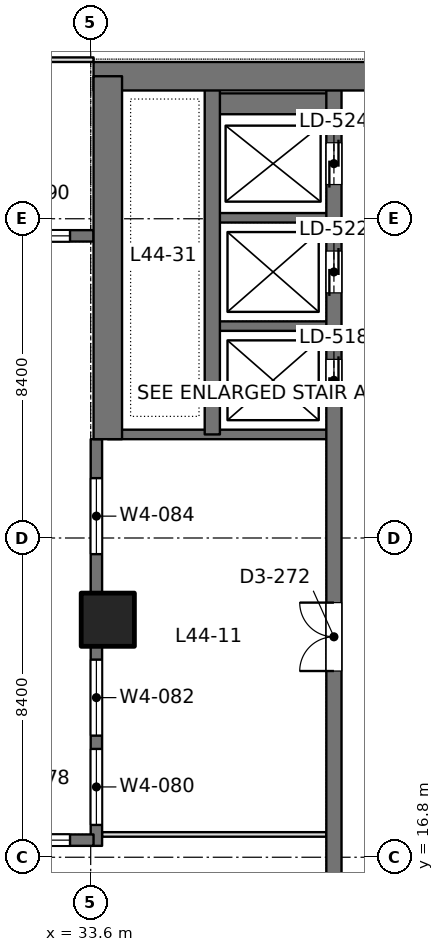
"""IFC4 building model, lengths in metres.
Left out: names, types, materials, properties, quantities, classifications, styles, units other than length and angle.
Written with IfcOpenShell. Run it as: python <this file> out.ifc"""

import sys

from ifc_helpers import new_model, si_unit, direction, frame, frame_2d, origin, origin_2d, place, context, subcontext, project, spatial, rectangle, extrude, element, fill, save


model = new_model("IFC4")
c1 = context("Model", 3, precision=1e-05, world=origin(), true_north=direction((0.0, 1.0)))
c2 = subcontext(c1, "Body", "Model", "MODEL_VIEW")
j1 = project(units=[si_unit("LENGTHUNIT", "METRE"), si_unit("PLANEANGLEUNIT", "RADIAN")], contexts=[c1])
p1 = place(None, origin())
s1 = spatial("IfcSite", under=j1, at=p1, CompositionType="ELEMENT")
p2 = place(p1, origin())
s2 = spatial("IfcBuilding", under=s1, at=p2, CompositionType="ELEMENT")
p3 = place(p2, frame((0.0, 0.0, 194.4)))
s3 = spatial("IfcBuildingStorey", under=s2, at=p3, CompositionType="ELEMENT", Elevation=194.4)
p4 = place(p3, frame((34.05, 23.05, 0.0), z_axis=(0.0, 0.0, 1.0), x_axis=(1.0, 0.0, 0.0)))
e1 = element("IfcColumn", 1, at=p4, inside=s3, PredefinedType="COLUMN", context=c2, shape_type="SweptSolid", body=[
    extrude(rectangle(XDim=1.4, YDim=1.4, at=origin_2d()), origin(), (0.0, 0.0, 1.0), 4.2),
])
p5 = place(p3, frame((33.675, 37.35, 0.0), z_axis=(0.0, 0.0, 1.0), x_axis=(1.0, 0.0, 0.0)))
e2 = element("IfcWall", 2, at=p5, inside=s3, PredefinedType="SHEAR", context=c2, shape_type="SweptSolid", body=[
    extrude(rectangle(XDim=17.85, YDim=0.75, at=frame_2d((8.925, 0.0))), origin(), (0.0, 0.0, 1.0), 4.2),
])
p6 = place(p5, frame((7.175, 0.0, 0.0)))
e3 = element("IfcOpeningElement", 3, at=p6, cuts=e2, PredefinedType="OPENING", context=c2, shape_type="SweptSolid", body=[
    extrude(rectangle(XDim=1.8, YDim=2.4, at=frame_2d((0.9, 1.2))), frame((0.0, 0.385, 0.0), z_axis=(0.0, -1.0, 0.0), x_axis=(1.0, 0.0, 0.0)), (0.0, 0.0, 1.0), 0.77),
])
p7 = place(p3, frame((34.05, 27.8, 0.0), z_axis=(0.0, 0.0, 1.0), x_axis=(0.0, 1.0, 0.0)))
e4 = element("IfcWall", 4, at=p7, inside=s3, PredefinedType="SHEAR", context=c2, shape_type="SweptSolid", body=[
    extrude(rectangle(XDim=9.55, YDim=0.75, at=frame_2d((4.775, 0.0))), origin(), (0.0, 0.0, 1.0), 4.2),
])
p8 = place(p3, frame((40.0, 13.05, 0.0), z_axis=(0.0, 0.0, 1.0), x_axis=(0.0, 1.0, 0.0)))
e5 = element("IfcWall", 5, at=p8, inside=s3, PredefinedType="SHEAR", context=c2, shape_type="SweptSolid", body=[
    extrude(rectangle(XDim=24.3, YDim=0.4, at=frame_2d((12.15, 0.0))), origin(), (0.0, 0.0, 1.0), 4.2),
])
p9 = place(p8, frame((15.75, 0.0, 0.0)))
e6 = element("IfcOpeningElement", 6, at=p9, cuts=e5, PredefinedType="OPENING", context=c2, shape_type="SweptSolid", body=[
    extrude(rectangle(XDim=1.1, YDim=2.2, at=frame_2d((0.55, 1.1))), frame((0.0, 0.21, 0.0), z_axis=(0.0, -1.0, 0.0), x_axis=(1.0, 0.0, 0.0)), (0.0, 0.0, 1.0), 0.42),
])
p10 = place(p8, frame((18.6, 0.0, 0.0)))
e7 = element("IfcOpeningElement", 7, at=p10, cuts=e5, PredefinedType="OPENING", context=c2, shape_type="SweptSolid", body=[
    extrude(rectangle(XDim=1.1, YDim=2.2, at=frame_2d((0.55, 1.1))), frame((0.0, 0.21, 0.0), z_axis=(0.0, -1.0, 0.0), x_axis=(1.0, 0.0, 0.0)), (0.0, 0.0, 1.0), 0.42),
])
p11 = place(p8, frame((21.45, 0.0, 0.0)))
e8 = element("IfcOpeningElement", 8, at=p11, cuts=e5, PredefinedType="OPENING", context=c2, shape_type="SweptSolid", body=[
    extrude(rectangle(XDim=1.1, YDim=2.2, at=frame_2d((0.55, 1.1))), frame((0.0, 0.21, 0.0), z_axis=(0.0, -1.0, 0.0), x_axis=(1.0, 0.0, 0.0)), (0.0, 0.0, 1.0), 0.42),
])
p12 = place(p8, frame((8.65, 0.0, 0.0)))
e9 = element("IfcOpeningElement", 9, at=p12, cuts=e5, PredefinedType="OPENING", context=c2, shape_type="SweptSolid", body=[
    extrude(rectangle(XDim=1.8, YDim=2.4, at=frame_2d((0.9, 1.2))), frame((0.0, 0.21, 0.0), z_axis=(0.0, -1.0, 0.0), x_axis=(1.0, 0.0, 0.0)), (0.0, 0.0, 1.0), 0.42),
])
p13 = place(p3, frame((36.8, 27.925, 0.0), z_axis=(0.0, 0.0, 1.0), x_axis=(0.0, 1.0, 0.0)))
e10 = element("IfcWall", 10, at=p13, inside=s3, PredefinedType="SHEAR", context=c2, shape_type="SweptSolid", body=[
    extrude(rectangle(XDim=9.425, YDim=0.4, at=frame_2d((4.712, 0.0))), origin(), (0.0, 0.0, 1.0), 4.2),
])
p14 = place(p3, frame((40.0, 27.925, 0.0), z_axis=(0.0, 0.0, 1.0), x_axis=(-1.0, 0.0, 0.0)))
e11 = element("IfcWall", 11, at=p14, inside=s3, PredefinedType="SHEAR", context=c2, shape_type="SweptSolid", body=[
    extrude(rectangle(XDim=5.95, YDim=0.25, at=frame_2d((2.975, 0.0))), origin(), (0.0, 0.0, 1.0), 4.2),
])
for number, where, z_axis, x_axis in (
    (12, (40.0, 30.775, 0.0), (0.0, 0.0, 1.0), (-1.0, 0.0, 0.0)),
    (13, (40.0, 33.625, 0.0), (0.0, 0.0, 1.0), (-1.0, 0.0, 0.0)),
):
    element("IfcWall", number, at=place(p3, frame(where, z_axis=z_axis, x_axis=x_axis)), inside=s3, PredefinedType="SHEAR", context=c2, shape_type="SweptSolid", body=[
        extrude(rectangle(XDim=3.2, YDim=0.25, at=frame_2d((1.6, 0.0))), origin(), (0.0, 0.0, 1.0), 4.2),
    ])
p15 = place(p3, frame((40.0, 36.625, 0.0), z_axis=(0.0, 0.0, 1.0), x_axis=(-1.0, 0.0, 0.0)))
e14 = element("IfcWall", 14, at=p15, inside=s3, PredefinedType="SHEAR", context=c2, shape_type="SweptSolid", body=[
    extrude(rectangle(XDim=3.2, YDim=0.55, at=frame_2d((1.6, 0.0))), origin(), (0.0, 0.0, 1.0), 4.2),
])
p16 = place(p3, frame((33.75, 17.1, 0.0), z_axis=(0.0, 0.0, 1.0), x_axis=(0.0, 1.0, 0.0)))
e15 = element("IfcWall", 15, at=p16, inside=s3, PredefinedType="SOLIDWALL", context=c2, shape_type="SweptSolid", body=[
    extrude(rectangle(XDim=10.7, YDim=0.3, at=frame_2d((5.35, 0.0))), origin(), (0.0, 0.0, 1.0), 4.05),
])
p17 = place(p16, frame((0.55, 0.0, 0.9)))
e16 = element("IfcOpeningElement", 16, at=p17, cuts=e15, PredefinedType="OPENING", context=c2, shape_type="SweptSolid", body=[
    extrude(rectangle(XDim=2.0, YDim=1.9, at=frame_2d((1.0, 0.95))), frame((0.0, 0.16, 0.0), z_axis=(0.0, -1.0, 0.0), x_axis=(1.0, 0.0, 0.0)), (0.0, 0.0, 1.0), 0.32),
])
p18 = place(p16, frame((2.9, 0.0, 0.9)))
e17 = element("IfcOpeningElement", 17, at=p18, cuts=e15, PredefinedType="OPENING", context=c2, shape_type="SweptSolid", body=[
    extrude(rectangle(XDim=2.0, YDim=1.9, at=frame_2d((1.0, 0.95))), frame((0.0, 0.16, 0.0), z_axis=(0.0, -1.0, 0.0), x_axis=(1.0, 0.0, 0.0)), (0.0, 0.0, 1.0), 0.32),
])
p19 = place(p16, frame((7.675, 0.0, 0.9)))
e18 = element("IfcOpeningElement", 18, at=p19, cuts=e15, PredefinedType="OPENING", context=c2, shape_type="SweptSolid", body=[
    extrude(rectangle(XDim=2.0, YDim=1.9, at=frame_2d((1.0, 0.95))), frame((0.0, 0.16, 0.0), z_axis=(0.0, -1.0, 0.0), x_axis=(1.0, 0.0, 0.0)), (0.0, 0.0, 1.0), 0.32),
])
p20 = place(p3, frame((25.75, 17.25, 0.0), z_axis=(0.0, 0.0, 1.0), x_axis=(1.0, 0.0, 0.0)))
e19 = element("IfcWall", 19, at=p20, inside=s3, PredefinedType="SOLIDWALL", context=c2, shape_type="SweptSolid", body=[
    extrude(rectangle(XDim=7.925, YDim=0.3, at=frame_2d((3.962, 0.0))), origin(), (0.0, 0.0, 1.0), 4.05),
])
p21 = place(p20, frame((0.069, 0.0, 0.9)))
e20 = element("IfcOpeningElement", 20, at=p21, cuts=e19, PredefinedType="OPENING", context=c2, shape_type="SweptSolid", body=[
    extrude(rectangle(XDim=2.0, YDim=1.9, at=frame_2d((1.0, 0.95))), frame((0.0, 0.16, 0.0), z_axis=(0.0, -1.0, 0.0), x_axis=(1.0, 0.0, 0.0)), (0.0, 0.0, 1.0), 0.32),
])
p22 = place(p20, frame((2.688, 0.0, 0.9)))
e21 = element("IfcOpeningElement", 21, at=p22, cuts=e19, PredefinedType="OPENING", context=c2, shape_type="SweptSolid", body=[
    extrude(rectangle(XDim=2.0, YDim=1.9, at=frame_2d((1.0, 0.95))), frame((0.0, 0.16, 0.0), z_axis=(0.0, -1.0, 0.0), x_axis=(1.0, 0.0, 0.0)), (0.0, 0.0, 1.0), 0.32),
])
p23 = place(p20, frame((5.306, 0.0, 0.9)))
e22 = element("IfcOpeningElement", 22, at=p23, cuts=e19, PredefinedType="OPENING", context=c2, shape_type="SweptSolid", body=[
    extrude(rectangle(XDim=2.0, YDim=1.9, at=frame_2d((1.0, 0.95))), frame((0.0, 0.16, 0.0), z_axis=(0.0, -1.0, 0.0), x_axis=(1.0, 0.0, 0.0)), (0.0, 0.0, 1.0), 0.32),
])
p24 = place(p3, frame((25.75, 33.15, 0.0), z_axis=(0.0, 0.0, 1.0), x_axis=(1.0, 0.0, 0.0)))
e23 = element("IfcWall", 23, at=p24, inside=s3, PredefinedType="SOLIDWALL", context=c2, shape_type="SweptSolid", body=[
    extrude(rectangle(XDim=7.925, YDim=0.3, at=frame_2d((3.962, 0.0))), origin(), (0.0, 0.0, 1.0), 4.05),
])
p25 = place(p24, frame((0.069, 0.0, 0.9)))
e24 = element("IfcOpeningElement", 24, at=p25, cuts=e23, PredefinedType="OPENING", context=c2, shape_type="SweptSolid", body=[
    extrude(rectangle(XDim=2.0, YDim=1.9, at=frame_2d((1.0, 0.95))), frame((0.0, 0.16, 0.0), z_axis=(0.0, -1.0, 0.0), x_axis=(1.0, 0.0, 0.0)), (0.0, 0.0, 1.0), 0.32),
])
p26 = place(p24, frame((2.688, 0.0, 0.9)))
e25 = element("IfcOpeningElement", 25, at=p26, cuts=e23, PredefinedType="OPENING", context=c2, shape_type="SweptSolid", body=[
    extrude(rectangle(XDim=2.0, YDim=1.9, at=frame_2d((1.0, 0.95))), frame((0.0, 0.16, 0.0), z_axis=(0.0, -1.0, 0.0), x_axis=(1.0, 0.0, 0.0)), (0.0, 0.0, 1.0), 0.32),
])
p27 = place(p24, frame((5.306, 0.0, 0.9)))
e26 = element("IfcOpeningElement", 26, at=p27, cuts=e23, PredefinedType="OPENING", context=c2, shape_type="SweptSolid", body=[
    extrude(rectangle(XDim=2.0, YDim=1.9, at=frame_2d((1.0, 0.95))), frame((0.0, 0.16, 0.0), z_axis=(0.0, -1.0, 0.0), x_axis=(1.0, 0.0, 0.0)), (0.0, 0.0, 1.0), 0.32),
])
p28 = place(p3, frame((33.898, 17.4, 0.0), z_axis=(0.0, 0.0, 1.0), x_axis=(1.0, 0.0, 0.0)))
e27 = element("IfcWall", 27, at=p28, inside=s3, PredefinedType="PARTITIONING", context=c2, shape_type="SweptSolid", body=[
    extrude(rectangle(XDim=5.904, YDim=0.12, at=frame_2d((2.952, 0.0))), origin(), (0.0, 0.0, 1.0), 3.55),
])
p29 = place(p3, frame((16.725, 37.785, 0.0), z_axis=(0.0, 0.0, 1.0), x_axis=(1.0, 0.0, 0.0)))
e28 = element("IfcWall", 28, at=p29, inside=s3, PredefinedType="PARTITIONING", context=c2, shape_type="SweptSolid", body=[
    extrude(rectangle(XDim=16.95, YDim=0.12, at=frame_2d((8.475, 0.0))), origin(), (0.0, 0.0, 1.0), 3.55),
])
p30 = place(p29, frame((7.575, 0.0, 0.0)))
e29 = element("IfcOpeningElement", 29, at=p30, cuts=e28, PredefinedType="OPENING", context=c2, shape_type="SweptSolid", body=[
    extrude(rectangle(XDim=1.8, YDim=2.2, at=frame_2d((0.9, 1.1))), frame((0.0, 0.07, 0.0), z_axis=(0.0, -1.0, 0.0), x_axis=(1.0, 0.0, 0.0)), (0.0, 0.0, 1.0), 0.14),
])
p31 = place(p17, origin())
e30 = element("IfcWindow", 30, at=p31, inside=s3, PartitioningType="SINGLE_PANEL", PredefinedType="WINDOW", context=c2, shape_type="SweptSolid", body=[
    extrude(rectangle(XDim=2.0, YDim=1.9, at=frame_2d((1.0, 0.95))), frame((0.0, 0.03, 0.0), z_axis=(0.0, -1.0, 0.0), x_axis=(1.0, 0.0, 0.0)), (0.0, 0.0, 1.0), 0.06),
])
fill(e16, e30)
p32 = place(p18, origin())
e31 = element("IfcWindow", 31, at=p32, inside=s3, PartitioningType="SINGLE_PANEL", PredefinedType="WINDOW", context=c2, shape_type="SweptSolid", body=[
    extrude(rectangle(XDim=2.0, YDim=1.9, at=frame_2d((1.0, 0.95))), frame((0.0, 0.03, 0.0), z_axis=(0.0, -1.0, 0.0), x_axis=(1.0, 0.0, 0.0)), (0.0, 0.0, 1.0), 0.06),
])
fill(e17, e31)
p33 = place(p19, origin())
e32 = element("IfcWindow", 32, at=p33, inside=s3, PartitioningType="SINGLE_PANEL", PredefinedType="WINDOW", context=c2, shape_type="SweptSolid", body=[
    extrude(rectangle(XDim=2.0, YDim=1.9, at=frame_2d((1.0, 0.95))), frame((0.0, 0.03, 0.0), z_axis=(0.0, -1.0, 0.0), x_axis=(1.0, 0.0, 0.0)), (0.0, 0.0, 1.0), 0.06),
])
fill(e18, e32)
p34 = place(p23, origin())
e33 = element("IfcWindow", 33, at=p34, inside=s3, PartitioningType="SINGLE_PANEL", PredefinedType="WINDOW", context=c2, shape_type="SweptSolid", body=[
    extrude(rectangle(XDim=2.0, YDim=1.9, at=frame_2d((1.0, 0.95))), frame((0.0, 0.03, 0.0), z_axis=(0.0, -1.0, 0.0), x_axis=(1.0, 0.0, 0.0)), (0.0, 0.0, 1.0), 0.06),
])
fill(e22, e33)
p35 = place(p27, origin())
e34 = element("IfcWindow", 34, at=p35, inside=s3, PartitioningType="SINGLE_PANEL", PredefinedType="WINDOW", context=c2, shape_type="SweptSolid", body=[
    extrude(rectangle(XDim=2.0, YDim=1.9, at=frame_2d((1.0, 0.95))), frame((0.0, 0.03, 0.0), z_axis=(0.0, -1.0, 0.0), x_axis=(1.0, 0.0, 0.0)), (0.0, 0.0, 1.0), 0.06),
])
fill(e26, e34)
p36 = place(p9, origin())
e35 = element("IfcDoor", 35, at=p36, inside=s3, OperationType="DOUBLE_DOOR_SLIDING", PredefinedType="DOOR", context=c2, shape_type="SweptSolid", body=[
    extrude(rectangle(XDim=1.1, YDim=2.2, at=frame_2d((0.55, 1.1))), frame((0.0, 0.025, 0.0), z_axis=(0.0, -1.0, 0.0), x_axis=(1.0, 0.0, 0.0)), (0.0, 0.0, 1.0), 0.05),
])
fill(e6, e35)
p37 = place(p10, origin())
e36 = element("IfcDoor", 36, at=p37, inside=s3, OperationType="DOUBLE_DOOR_SLIDING", PredefinedType="DOOR", context=c2, shape_type="SweptSolid", body=[
    extrude(rectangle(XDim=1.1, YDim=2.2, at=frame_2d((0.55, 1.1))), frame((0.0, 0.025, 0.0), z_axis=(0.0, -1.0, 0.0), x_axis=(1.0, 0.0, 0.0)), (0.0, 0.0, 1.0), 0.05),
])
fill(e7, e36)
p38 = place(p11, origin())
e37 = element("IfcDoor", 37, at=p38, inside=s3, OperationType="DOUBLE_DOOR_SLIDING", PredefinedType="DOOR", context=c2, shape_type="SweptSolid", body=[
    extrude(rectangle(XDim=1.1, YDim=2.2, at=frame_2d((0.55, 1.1))), frame((0.0, 0.025, 0.0), z_axis=(0.0, -1.0, 0.0), x_axis=(1.0, 0.0, 0.0)), (0.0, 0.0, 1.0), 0.05),
])
fill(e8, e37)
p39 = place(p12, origin())
e38 = element("IfcDoor", 38, at=p39, inside=s3, OperationType="DOUBLE_DOOR_SINGLE_SWING", PredefinedType="DOOR", context=c2, shape_type="SweptSolid", body=[
    extrude(rectangle(XDim=1.8, YDim=2.4, at=frame_2d((0.9, 1.2))), frame((0.0, 0.025, 0.0), z_axis=(0.0, -1.0, 0.0), x_axis=(1.0, 0.0, 0.0)), (0.0, 0.0, 1.0), 0.05),
])
fill(e9, e38)
save(model, sys.argv[1])
